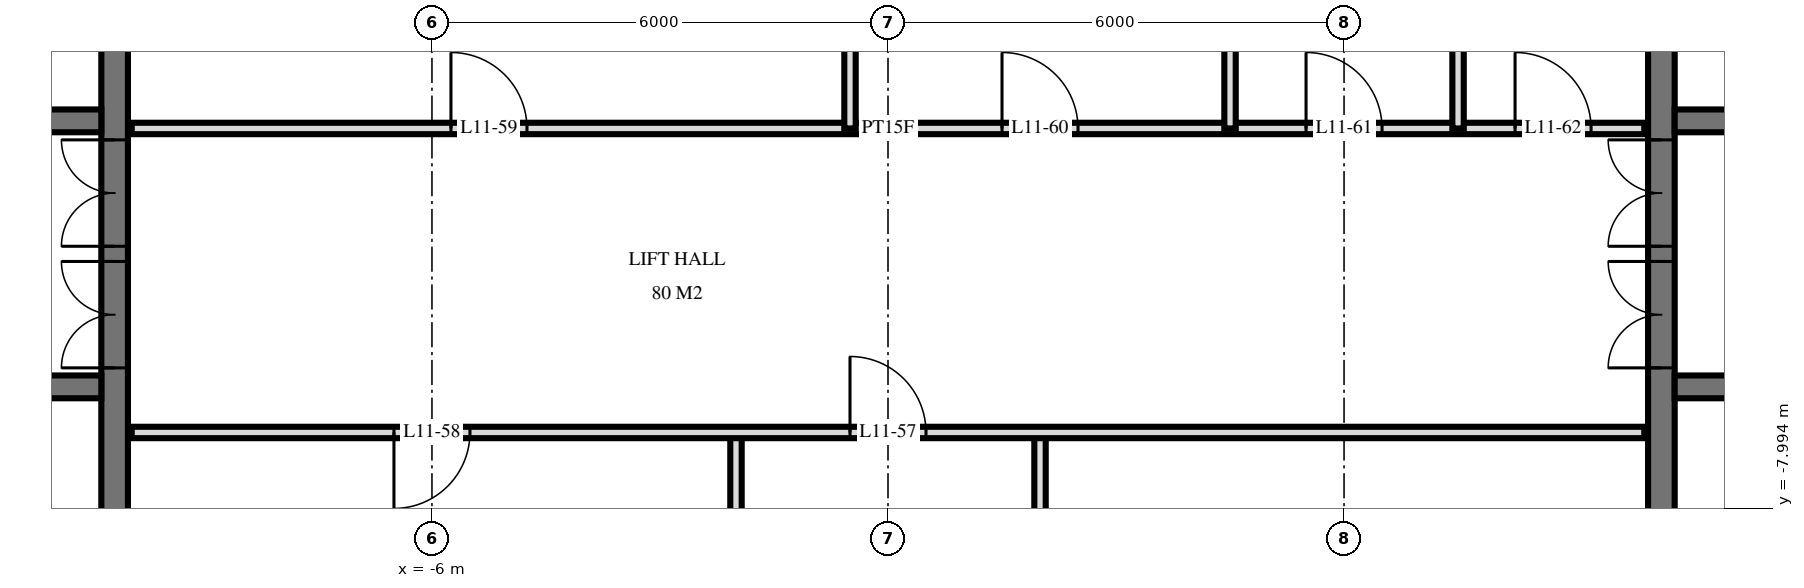
"""IFC4 building model, lengths in metres.
Left out: names, types, materials, properties, quantities, classifications, styles, units other than length and angle.
Written with IfcOpenShell. Run it as: python <this file> out.ifc"""

import sys

from ifc_helpers import new_model, si_unit, direction, frame, frame_2d, origin, place, context, subcontext, project, spatial, rectangle, extrude, element, fill, save


model = new_model("IFC4")
c1 = context("Model", 3, precision=1e-05, world=origin(), true_north=direction((0.0, 1.0)))
c2 = subcontext(c1, "Body", "Model", "MODEL_VIEW")
j1 = project(units=[si_unit("LENGTHUNIT", "METRE"), si_unit("PLANEANGLEUNIT", "RADIAN")], contexts=[c1])
p1 = place(None, origin())
s1 = spatial("IfcSite", under=j1, at=p1, CompositionType="ELEMENT")
p2 = place(p1, origin())
s2 = spatial("IfcBuilding", under=s1, at=p2, CompositionType="ELEMENT")
p3 = place(p2, frame((0.0, 0.0, 49.2)))
s3 = spatial("IfcBuildingStorey", under=s2, at=p3, CompositionType="ELEMENT", Elevation=49.2)
p4 = place(p3, frame((-10.175, -14.55, 0.0), z_axis=(0.0, 0.0, 1.0), x_axis=(0.0, 1.0, 0.0)))
e1 = element("IfcWall", 1, at=p4, inside=s3, PredefinedType="SHEAR", context=c2, shape_type="SweptSolid", body=[
    extrude(rectangle(XDim=14.1, YDim=0.35, at=frame_2d((7.05, 0.0))), origin(), (0.0, 0.0, 1.0), 3.6),
])
p5 = place(p4, frame((8.4, 0.0, 0.0)))
e2 = element("IfcOpeningElement", 2, at=p5, cuts=e1, PredefinedType="OPENING", context=c2, shape_type="SweptSolid", body=[
    extrude(rectangle(XDim=1.4, YDim=2.4, at=frame_2d((0.7, 1.2))), frame((0.0, 0.185, 0.0), z_axis=(0.0, -1.0, 0.0), x_axis=(1.0, 0.0, 0.0)), (0.0, 0.0, 1.0), 0.37),
])
p6 = place(p4, frame((10.0, 0.0, 0.0)))
e3 = element("IfcOpeningElement", 3, at=p6, cuts=e1, PredefinedType="OPENING", context=c2, shape_type="SweptSolid", body=[
    extrude(rectangle(XDim=1.4, YDim=2.4, at=frame_2d((0.7, 1.2))), frame((0.0, 0.185, 0.0), z_axis=(0.0, -1.0, 0.0), x_axis=(1.0, 0.0, 0.0)), (0.0, 0.0, 1.0), 0.37),
])
p7 = place(p4, frame((4.0, 0.0, 0.0)))
e4 = element("IfcOpeningElement", 4, at=p7, cuts=e1, PredefinedType="OPENING", context=c2, shape_type="SweptSolid", body=[
    extrude(rectangle(XDim=1.2, YDim=2.1, at=frame_2d((0.6, 1.05))), frame((0.0, 0.185, 0.0), z_axis=(0.0, -1.0, 0.0), x_axis=(1.0, 0.0, 0.0)), (0.0, 0.0, 1.0), 0.37),
])
p8 = place(p3, frame((-29.05, -2.9, 0.0), z_axis=(0.0, 0.0, 1.0), x_axis=(1.0, 0.0, 0.0)))
e5 = element("IfcWall", 5, at=p8, inside=s3, PredefinedType="SHEAR", context=c2, shape_type="SweptSolid", body=[
    extrude(rectangle(XDim=18.7, YDim=0.3, at=frame_2d((9.35, 0.0))), origin(), (0.0, 0.0, 1.0), 3.6),
])
p9 = place(p8, frame((2.95, 0.0, 0.0)))
e6 = element("IfcOpeningElement", 6, at=p9, cuts=e5, PredefinedType="OPENING", context=c2, shape_type="SweptSolid", body=[
    extrude(rectangle(XDim=1.1, YDim=2.1, at=frame_2d((0.55, 1.05))), frame((0.0, 0.16, 0.0), z_axis=(0.0, -1.0, 0.0), x_axis=(1.0, 0.0, 0.0)), (0.0, 0.0, 1.0), 0.32),
])
p10 = place(p8, frame((0.55, 0.0, 0.0)))
e7 = element("IfcOpeningElement", 7, at=p10, cuts=e5, PredefinedType="OPENING", context=c2, shape_type="SweptSolid", body=[
    extrude(rectangle(XDim=1.1, YDim=2.1, at=frame_2d((0.55, 1.05))), frame((0.0, 0.16, 0.0), z_axis=(0.0, -1.0, 0.0), x_axis=(1.0, 0.0, 0.0)), (0.0, 0.0, 1.0), 0.32),
])
p11 = place(p8, frame((10.9, 0.0, 0.0)))
e8 = element("IfcOpeningElement", 8, at=p11, cuts=e5, PredefinedType="OPENING", context=c2, shape_type="SweptSolid", body=[
    extrude(rectangle(XDim=0.9, YDim=2.1, at=frame_2d((0.45, 1.05))), frame((0.0, 0.16, 0.0), z_axis=(0.0, -1.0, 0.0), x_axis=(1.0, 0.0, 0.0)), (0.0, 0.0, 1.0), 0.32),
])
p12 = place(p8, frame((16.85, 0.0, 0.0)))
e9 = element("IfcOpeningElement", 9, at=p12, cuts=e5, PredefinedType="OPENING", context=c2, shape_type="SweptSolid", body=[
    extrude(rectangle(XDim=1.0, YDim=2.1, at=frame_2d((0.5, 1.05))), frame((0.0, 0.16, 0.0), z_axis=(0.0, -1.0, 0.0), x_axis=(1.0, 0.0, 0.0)), (0.0, 0.0, 1.0), 0.32),
])
p13 = place(p8, frame((14.312, 0.0, 0.0)))
e10 = element("IfcOpeningElement", 10, at=p13, cuts=e5, PredefinedType="OPENING", context=c2, shape_type="SweptSolid", body=[
    extrude(rectangle(XDim=1.0, YDim=2.1, at=frame_2d((0.5, 1.05))), frame((0.0, 0.16, 0.0), z_axis=(0.0, -1.0, 0.0), x_axis=(1.0, 0.0, 0.0)), (0.0, 0.0, 1.0), 0.32),
])
p14 = place(p8, frame((12.887, 0.0, 0.0)))
e11 = element("IfcOpeningElement", 11, at=p14, cuts=e5, PredefinedType="OPENING", context=c2, shape_type="SweptSolid", body=[
    extrude(rectangle(XDim=1.0, YDim=2.1, at=frame_2d((0.5, 1.05))), frame((0.0, 0.16, 0.0), z_axis=(0.0, -1.0, 0.0), x_axis=(1.0, 0.0, 0.0)), (0.0, 0.0, 1.0), 0.32),
])
p15 = place(p8, frame((5.6, 0.0, 0.0)))
e12 = element("IfcOpeningElement", 12, at=p15, cuts=e5, PredefinedType="OPENING", context=c2, shape_type="SweptSolid", body=[
    extrude(rectangle(XDim=1.0, YDim=2.1, at=frame_2d((0.5, 1.05))), frame((0.0, 0.16, 0.0), z_axis=(0.0, -1.0, 0.0), x_axis=(1.0, 0.0, 0.0)), (0.0, 0.0, 1.0), 0.32),
])
p16 = place(p3, frame((-29.05, -6.4, 0.0), z_axis=(0.0, 0.0, 1.0), x_axis=(1.0, 0.0, 0.0)))
e13 = element("IfcWall", 13, at=p16, inside=s3, PredefinedType="SHEAR", context=c2, shape_type="SweptSolid", body=[
    extrude(rectangle(XDim=18.7, YDim=0.3, at=frame_2d((9.35, 0.0))), origin(), (0.0, 0.0, 1.0), 3.6),
])
p17 = place(p16, frame((2.95, 0.0, 0.0)))
e14 = element("IfcOpeningElement", 14, at=p17, cuts=e13, PredefinedType="OPENING", context=c2, shape_type="SweptSolid", body=[
    extrude(rectangle(XDim=1.1, YDim=2.1, at=frame_2d((0.55, 1.05))), frame((0.0, 0.16, 0.0), z_axis=(0.0, -1.0, 0.0), x_axis=(1.0, 0.0, 0.0)), (0.0, 0.0, 1.0), 0.32),
])
p18 = place(p16, frame((0.55, 0.0, 0.0)))
e15 = element("IfcOpeningElement", 15, at=p18, cuts=e13, PredefinedType="OPENING", context=c2, shape_type="SweptSolid", body=[
    extrude(rectangle(XDim=1.1, YDim=2.1, at=frame_2d((0.55, 1.05))), frame((0.0, 0.16, 0.0), z_axis=(0.0, -1.0, 0.0), x_axis=(1.0, 0.0, 0.0)), (0.0, 0.0, 1.0), 0.32),
])
p19 = place(p16, frame((10.8, 0.0, 0.0)))
e16 = element("IfcOpeningElement", 16, at=p19, cuts=e13, PredefinedType="OPENING", context=c2, shape_type="SweptSolid", body=[
    extrude(rectangle(XDim=1.1, YDim=2.1, at=frame_2d((0.55, 1.05))), frame((0.0, 0.16, 0.0), z_axis=(0.0, -1.0, 0.0), x_axis=(1.0, 0.0, 0.0)), (0.0, 0.0, 1.0), 0.32),
])
p20 = place(p16, frame((5.6, 0.0, 0.0)))
e17 = element("IfcOpeningElement", 17, at=p20, cuts=e13, PredefinedType="OPENING", context=c2, shape_type="SweptSolid", body=[
    extrude(rectangle(XDim=1.0, YDim=2.1, at=frame_2d((0.5, 1.05))), frame((0.0, 0.16, 0.0), z_axis=(0.0, -1.0, 0.0), x_axis=(1.0, 0.0, 0.0)), (0.0, 0.0, 1.0), 0.32),
])
p21 = place(p3, frame((10.175, -14.55, 0.0), z_axis=(0.0, 0.0, 1.0), x_axis=(0.0, 1.0, 0.0)))
e18 = element("IfcWall", 18, at=p21, inside=s3, PredefinedType="SHEAR", context=c2, shape_type="SweptSolid", body=[
    extrude(rectangle(XDim=14.1, YDim=0.35, at=frame_2d((7.05, 0.0))), origin(), (0.0, 0.0, 1.0), 3.6),
])
p22 = place(p21, frame((8.4, 0.0, 0.0)))
e19 = element("IfcOpeningElement", 19, at=p22, cuts=e18, PredefinedType="OPENING", context=c2, shape_type="SweptSolid", body=[
    extrude(rectangle(XDim=1.4, YDim=2.4, at=frame_2d((0.7, 1.2))), frame((0.0, 0.185, 0.0), z_axis=(0.0, -1.0, 0.0), x_axis=(1.0, 0.0, 0.0)), (0.0, 0.0, 1.0), 0.37),
])
p23 = place(p21, frame((10.0, 0.0, 0.0)))
e20 = element("IfcOpeningElement", 20, at=p23, cuts=e18, PredefinedType="OPENING", context=c2, shape_type="SweptSolid", body=[
    extrude(rectangle(XDim=1.4, YDim=2.4, at=frame_2d((0.7, 1.2))), frame((0.0, 0.185, 0.0), z_axis=(0.0, -1.0, 0.0), x_axis=(1.0, 0.0, 0.0)), (0.0, 0.0, 1.0), 0.37),
])
p24 = place(p21, frame((4.0, 0.0, 0.0)))
e21 = element("IfcOpeningElement", 21, at=p24, cuts=e18, PredefinedType="OPENING", context=c2, shape_type="SweptSolid", body=[
    extrude(rectangle(XDim=1.2, YDim=2.1, at=frame_2d((0.6, 1.05))), frame((0.0, 0.185, 0.0), z_axis=(0.0, -1.0, 0.0), x_axis=(1.0, 0.0, 0.0)), (0.0, 0.0, 1.0), 0.37),
])
p25 = place(p3, frame((10.35, -2.9, 0.0), z_axis=(0.0, 0.0, 1.0), x_axis=(1.0, 0.0, 0.0)))
e22 = element("IfcWall", 22, at=p25, inside=s3, PredefinedType="SHEAR", context=c2, shape_type="SweptSolid", body=[
    extrude(rectangle(XDim=18.7, YDim=0.3, at=frame_2d((9.35, 0.0))), origin(), (0.0, 0.0, 1.0), 3.6),
])
p26 = place(p25, frame((14.65, 0.0, 0.0)))
e23 = element("IfcOpeningElement", 23, at=p26, cuts=e22, PredefinedType="OPENING", context=c2, shape_type="SweptSolid", body=[
    extrude(rectangle(XDim=1.1, YDim=2.1, at=frame_2d((0.55, 1.05))), frame((0.0, 0.16, 0.0), z_axis=(0.0, -1.0, 0.0), x_axis=(1.0, 0.0, 0.0)), (0.0, 0.0, 1.0), 0.32),
])
p27 = place(p25, frame((17.05, 0.0, 0.0)))
e24 = element("IfcOpeningElement", 24, at=p27, cuts=e22, PredefinedType="OPENING", context=c2, shape_type="SweptSolid", body=[
    extrude(rectangle(XDim=1.1, YDim=2.1, at=frame_2d((0.55, 1.05))), frame((0.0, 0.16, 0.0), z_axis=(0.0, -1.0, 0.0), x_axis=(1.0, 0.0, 0.0)), (0.0, 0.0, 1.0), 0.32),
])
p28 = place(p25, frame((6.9, 0.0, 0.0)))
e25 = element("IfcOpeningElement", 25, at=p28, cuts=e22, PredefinedType="OPENING", context=c2, shape_type="SweptSolid", body=[
    extrude(rectangle(XDim=0.9, YDim=2.1, at=frame_2d((0.45, 1.05))), frame((0.0, 0.16, 0.0), z_axis=(0.0, -1.0, 0.0), x_axis=(1.0, 0.0, 0.0)), (0.0, 0.0, 1.0), 0.32),
])
p29 = place(p25, frame((0.85, 0.0, 0.0)))
e26 = element("IfcOpeningElement", 26, at=p29, cuts=e22, PredefinedType="OPENING", context=c2, shape_type="SweptSolid", body=[
    extrude(rectangle(XDim=1.0, YDim=2.1, at=frame_2d((0.5, 1.05))), frame((0.0, 0.16, 0.0), z_axis=(0.0, -1.0, 0.0), x_axis=(1.0, 0.0, 0.0)), (0.0, 0.0, 1.0), 0.32),
])
p30 = place(p25, frame((3.387, 0.0, 0.0)))
e27 = element("IfcOpeningElement", 27, at=p30, cuts=e22, PredefinedType="OPENING", context=c2, shape_type="SweptSolid", body=[
    extrude(rectangle(XDim=1.0, YDim=2.1, at=frame_2d((0.5, 1.05))), frame((0.0, 0.16, 0.0), z_axis=(0.0, -1.0, 0.0), x_axis=(1.0, 0.0, 0.0)), (0.0, 0.0, 1.0), 0.32),
])
p31 = place(p25, frame((4.812, 0.0, 0.0)))
e28 = element("IfcOpeningElement", 28, at=p31, cuts=e22, PredefinedType="OPENING", context=c2, shape_type="SweptSolid", body=[
    extrude(rectangle(XDim=1.0, YDim=2.1, at=frame_2d((0.5, 1.05))), frame((0.0, 0.16, 0.0), z_axis=(0.0, -1.0, 0.0), x_axis=(1.0, 0.0, 0.0)), (0.0, 0.0, 1.0), 0.32),
])
p32 = place(p25, frame((12.1, 0.0, 0.0)))
e29 = element("IfcOpeningElement", 29, at=p32, cuts=e22, PredefinedType="OPENING", context=c2, shape_type="SweptSolid", body=[
    extrude(rectangle(XDim=1.0, YDim=2.1, at=frame_2d((0.5, 1.05))), frame((0.0, 0.16, 0.0), z_axis=(0.0, -1.0, 0.0), x_axis=(1.0, 0.0, 0.0)), (0.0, 0.0, 1.0), 0.32),
])
p33 = place(p3, frame((10.35, -6.4, 0.0), z_axis=(0.0, 0.0, 1.0), x_axis=(1.0, 0.0, 0.0)))
e30 = element("IfcWall", 30, at=p33, inside=s3, PredefinedType="SHEAR", context=c2, shape_type="SweptSolid", body=[
    extrude(rectangle(XDim=18.7, YDim=0.3, at=frame_2d((9.35, 0.0))), origin(), (0.0, 0.0, 1.0), 3.6),
])
p34 = place(p33, frame((14.65, 0.0, 0.0)))
e31 = element("IfcOpeningElement", 31, at=p34, cuts=e30, PredefinedType="OPENING", context=c2, shape_type="SweptSolid", body=[
    extrude(rectangle(XDim=1.1, YDim=2.1, at=frame_2d((0.55, 1.05))), frame((0.0, 0.16, 0.0), z_axis=(0.0, -1.0, 0.0), x_axis=(1.0, 0.0, 0.0)), (0.0, 0.0, 1.0), 0.32),
])
p35 = place(p33, frame((17.05, 0.0, 0.0)))
e32 = element("IfcOpeningElement", 32, at=p35, cuts=e30, PredefinedType="OPENING", context=c2, shape_type="SweptSolid", body=[
    extrude(rectangle(XDim=1.1, YDim=2.1, at=frame_2d((0.55, 1.05))), frame((0.0, 0.16, 0.0), z_axis=(0.0, -1.0, 0.0), x_axis=(1.0, 0.0, 0.0)), (0.0, 0.0, 1.0), 0.32),
])
p36 = place(p33, frame((6.8, 0.0, 0.0)))
e33 = element("IfcOpeningElement", 33, at=p36, cuts=e30, PredefinedType="OPENING", context=c2, shape_type="SweptSolid", body=[
    extrude(rectangle(XDim=1.1, YDim=2.1, at=frame_2d((0.55, 1.05))), frame((0.0, 0.16, 0.0), z_axis=(0.0, -1.0, 0.0), x_axis=(1.0, 0.0, 0.0)), (0.0, 0.0, 1.0), 0.32),
])
p37 = place(p33, frame((12.1, 0.0, 0.0)))
e34 = element("IfcOpeningElement", 34, at=p37, cuts=e30, PredefinedType="OPENING", context=c2, shape_type="SweptSolid", body=[
    extrude(rectangle(XDim=1.0, YDim=2.1, at=frame_2d((0.5, 1.05))), frame((0.0, 0.16, 0.0), z_axis=(0.0, -1.0, 0.0), x_axis=(1.0, 0.0, 0.0)), (0.0, 0.0, 1.0), 0.32),
])
for number, where, z_axis, x_axis in (
    (35, (7.5, -3.0, 0.0), (0.0, 0.0, 1.0), (0.0, 1.0, 0.0)),
    (36, (4.5, -3.0, 0.0), (0.0, 0.0, 1.0), (0.0, 1.0, 0.0)),
):
    element("IfcWall", number, at=place(p3, frame(where, z_axis=z_axis, x_axis=x_axis)), inside=s3, PredefinedType="PLUMBINGWALL", context=c2, shape_type="SweptSolid", body=[
        extrude(rectangle(XDim=4.02, YDim=0.15, at=frame_2d((2.01, 0.0))), origin(), (0.0, 0.0, 1.0), 3.32),
    ])
p38 = place(p3, frame((2.0, -11.0, 0.0), z_axis=(0.0, 0.0, 1.0), x_axis=(0.0, 1.0, 0.0)))
e37 = element("IfcWall", 37, at=p38, inside=s3, PredefinedType="PARTITIONING", context=c2, shape_type="SweptSolid", body=[
    extrude(rectangle(XDim=4.0, YDim=0.15, at=frame_2d((2.0, 0.0))), origin(), (0.0, 0.0, 1.0), 3.32),
])
p39 = place(p3, frame((-0.5, -3.0, 0.0), z_axis=(0.0, 0.0, 1.0), x_axis=(0.0, 1.0, 0.0)))
e38 = element("IfcWall", 38, at=p39, inside=s3, PredefinedType="PARTITIONING", context=c2, shape_type="SweptSolid", body=[
    extrude(rectangle(XDim=4.02, YDim=0.15, at=frame_2d((2.01, 0.0))), origin(), (0.0, 0.0, 1.0), 3.32),
])
p40 = place(p3, frame((-2.0, -11.0, 0.0), z_axis=(0.0, 0.0, 1.0), x_axis=(0.0, 1.0, 0.0)))
e39 = element("IfcWall", 39, at=p40, inside=s3, PredefinedType="PARTITIONING", context=c2, shape_type="SweptSolid", body=[
    extrude(rectangle(XDim=4.0, YDim=0.15, at=frame_2d((2.0, 0.0))), origin(), (0.0, 0.0, 1.0), 3.32),
])
p41 = place(p3, frame((-9.95, -7.0, 0.0), z_axis=(0.0, 0.0, 1.0), x_axis=(1.0, 0.0, 0.0)))
e40 = element("IfcWall", 40, at=p41, inside=s3, PredefinedType="PARTITIONING", context=c2, shape_type="SweptSolid", body=[
    extrude(rectangle(XDim=19.9, YDim=0.15, at=frame_2d((9.95, 0.0))), origin(), (0.0, 0.0, 1.0), 3.32),
])
p42 = place(p41, frame((9.45, 0.0, 0.0)))
e41 = element("IfcOpeningElement", 41, at=p42, cuts=e40, PredefinedType="OPENING", context=c2, shape_type="SweptSolid", body=[
    extrude(rectangle(XDim=1.0, YDim=2.1, at=frame_2d((0.5, 1.05))), frame((0.0, 0.085, 0.0), z_axis=(0.0, -1.0, 0.0), x_axis=(1.0, 0.0, 0.0)), (0.0, 0.0, 1.0), 0.17),
])
p43 = place(p41, frame((3.45, 0.0, 0.0)))
e42 = element("IfcOpeningElement", 42, at=p43, cuts=e40, PredefinedType="OPENING", context=c2, shape_type="SweptSolid", body=[
    extrude(rectangle(XDim=1.0, YDim=2.1, at=frame_2d((0.5, 1.05))), frame((0.0, 0.085, 0.0), z_axis=(0.0, -1.0, 0.0), x_axis=(1.0, 0.0, 0.0)), (0.0, 0.0, 1.0), 0.17),
])
p44 = place(p3, frame((-9.95, -3.0, 0.0), z_axis=(0.0, 0.0, 1.0), x_axis=(1.0, 0.0, 0.0)))
e43 = element("IfcWall", 43, at=p44, inside=s3, PredefinedType="PARTITIONING", context=c2, shape_type="SweptSolid", body=[
    extrude(rectangle(XDim=19.9, YDim=0.15, at=frame_2d((9.95, 0.0))), origin(), (0.0, 0.0, 1.0), 3.32),
])
p45 = place(p44, frame((4.2, 0.0, 0.0)))
e44 = element("IfcOpeningElement", 44, at=p45, cuts=e43, PredefinedType="OPENING", context=c2, shape_type="SweptSolid", body=[
    extrude(rectangle(XDim=1.0, YDim=2.1, at=frame_2d((0.5, 1.05))), frame((0.0, 0.085, 0.0), z_axis=(0.0, -1.0, 0.0), x_axis=(1.0, 0.0, 0.0)), (0.0, 0.0, 1.0), 0.17),
])
p46 = place(p44, frame((11.45, 0.0, 0.0)))
e45 = element("IfcOpeningElement", 45, at=p46, cuts=e43, PredefinedType="OPENING", context=c2, shape_type="SweptSolid", body=[
    extrude(rectangle(XDim=1.0, YDim=2.1, at=frame_2d((0.5, 1.05))), frame((0.0, 0.085, 0.0), z_axis=(0.0, -1.0, 0.0), x_axis=(1.0, 0.0, 0.0)), (0.0, 0.0, 1.0), 0.17),
])
p47 = place(p44, frame((15.45, 0.0, 0.0)))
e46 = element("IfcOpeningElement", 46, at=p47, cuts=e43, PredefinedType="OPENING", context=c2, shape_type="SweptSolid", body=[
    extrude(rectangle(XDim=1.0, YDim=2.1, at=frame_2d((0.5, 1.05))), frame((0.0, 0.085, 0.0), z_axis=(0.0, -1.0, 0.0), x_axis=(1.0, 0.0, 0.0)), (0.0, 0.0, 1.0), 0.17),
])
p48 = place(p44, frame((18.2, 0.0, 0.0)))
e47 = element("IfcOpeningElement", 47, at=p48, cuts=e43, PredefinedType="OPENING", context=c2, shape_type="SweptSolid", body=[
    extrude(rectangle(XDim=1.0, YDim=2.1, at=frame_2d((0.5, 1.05))), frame((0.0, 0.085, 0.0), z_axis=(0.0, -1.0, 0.0), x_axis=(1.0, 0.0, 0.0)), (0.0, 0.0, 1.0), 0.17),
])
p49 = place(p5, origin())
e48 = element("IfcDoor", 48, at=p49, inside=s3, OperationType="DOUBLE_DOOR_SINGLE_SWING", PredefinedType="DOOR", context=c2, shape_type="SweptSolid", body=[
    extrude(rectangle(XDim=1.4, YDim=2.4, at=frame_2d((0.7, 1.2))), frame((0.0, 0.025, 0.0), z_axis=(0.0, -1.0, 0.0), x_axis=(1.0, 0.0, 0.0)), (0.0, 0.0, 1.0), 0.05),
])
fill(e2, e48)
p50 = place(p6, origin())
e49 = element("IfcDoor", 49, at=p50, inside=s3, OperationType="DOUBLE_DOOR_SINGLE_SWING", PredefinedType="DOOR", context=c2, shape_type="SweptSolid", body=[
    extrude(rectangle(XDim=1.4, YDim=2.4, at=frame_2d((0.7, 1.2))), frame((0.0, 0.025, 0.0), z_axis=(0.0, -1.0, 0.0), x_axis=(1.0, 0.0, 0.0)), (0.0, 0.0, 1.0), 0.05),
])
fill(e3, e49)
p51 = place(p22, origin())
e50 = element("IfcDoor", 50, at=p51, inside=s3, OperationType="DOUBLE_DOOR_SINGLE_SWING", PredefinedType="DOOR", context=c2, shape_type="SweptSolid", body=[
    extrude(rectangle(XDim=1.4, YDim=2.4, at=frame_2d((0.7, 1.2))), frame((0.0, 0.025, 0.0), z_axis=(0.0, -1.0, 0.0), x_axis=(1.0, 0.0, 0.0)), (0.0, 0.0, 1.0), 0.05),
])
fill(e19, e50)
p52 = place(p23, origin())
e51 = element("IfcDoor", 51, at=p52, inside=s3, OperationType="DOUBLE_DOOR_SINGLE_SWING", PredefinedType="DOOR", context=c2, shape_type="SweptSolid", body=[
    extrude(rectangle(XDim=1.4, YDim=2.4, at=frame_2d((0.7, 1.2))), frame((0.0, 0.025, 0.0), z_axis=(0.0, -1.0, 0.0), x_axis=(1.0, 0.0, 0.0)), (0.0, 0.0, 1.0), 0.05),
])
fill(e20, e51)
p53 = place(p42, origin())
e52 = element("IfcDoor", 52, at=p53, inside=s3, OperationType="SINGLE_SWING_RIGHT", PredefinedType="DOOR", context=c2, shape_type="SweptSolid", body=[
    extrude(rectangle(XDim=1.0, YDim=2.1, at=frame_2d((0.5, 1.05))), frame((0.0, 0.025, 0.0), z_axis=(0.0, -1.0, 0.0), x_axis=(1.0, 0.0, 0.0)), (0.0, 0.0, 1.0), 0.05),
])
fill(e41, e52)
p54 = place(p43, frame((0.5, 0.0, 0.0), z_axis=(0.0, 0.0, 1.0), x_axis=(-1.0, 0.0, 0.0)))
e53 = element("IfcDoor", 53, at=p54, inside=s3, OperationType="SINGLE_SWING_LEFT", PredefinedType="DOOR", context=c2, shape_type="SweptSolid", body=[
    extrude(rectangle(XDim=1.0, YDim=2.1, at=frame_2d((0.0, 1.05))), frame((0.0, -0.025, 0.0), z_axis=(0.0, 1.0, 0.0), x_axis=(-1.0, 0.0, 0.0)), (0.0, 0.0, 1.0), 0.05),
])
fill(e42, e53)
p55 = place(p45, origin())
e54 = element("IfcDoor", 54, at=p55, inside=s3, OperationType="SINGLE_SWING_RIGHT", PredefinedType="DOOR", context=c2, shape_type="SweptSolid", body=[
    extrude(rectangle(XDim=1.0, YDim=2.1, at=frame_2d((0.5, 1.05))), frame((0.0, 0.025, 0.0), z_axis=(0.0, -1.0, 0.0), x_axis=(1.0, 0.0, 0.0)), (0.0, 0.0, 1.0), 0.05),
])
fill(e44, e54)
p56 = place(p46, origin())
e55 = element("IfcDoor", 55, at=p56, inside=s3, OperationType="SINGLE_SWING_RIGHT", PredefinedType="DOOR", context=c2, shape_type="SweptSolid", body=[
    extrude(rectangle(XDim=1.0, YDim=2.1, at=frame_2d((0.5, 1.05))), frame((0.0, 0.025, 0.0), z_axis=(0.0, -1.0, 0.0), x_axis=(1.0, 0.0, 0.0)), (0.0, 0.0, 1.0), 0.05),
])
fill(e45, e55)
p57 = place(p47, origin())
e56 = element("IfcDoor", 56, at=p57, inside=s3, OperationType="SINGLE_SWING_RIGHT", PredefinedType="DOOR", context=c2, shape_type="SweptSolid", body=[
    extrude(rectangle(XDim=1.0, YDim=2.1, at=frame_2d((0.5, 1.05))), frame((0.0, 0.025, 0.0), z_axis=(0.0, -1.0, 0.0), x_axis=(1.0, 0.0, 0.0)), (0.0, 0.0, 1.0), 0.05),
])
fill(e46, e56)
p58 = place(p48, origin())
e57 = element("IfcDoor", 57, at=p58, inside=s3, OperationType="SINGLE_SWING_RIGHT", PredefinedType="DOOR", context=c2, shape_type="SweptSolid", body=[
    extrude(rectangle(XDim=1.0, YDim=2.1, at=frame_2d((0.5, 1.05))), frame((0.0, 0.025, 0.0), z_axis=(0.0, -1.0, 0.0), x_axis=(1.0, 0.0, 0.0)), (0.0, 0.0, 1.0), 0.05),
])
fill(e47, e57)
save(model, sys.argv[1])
